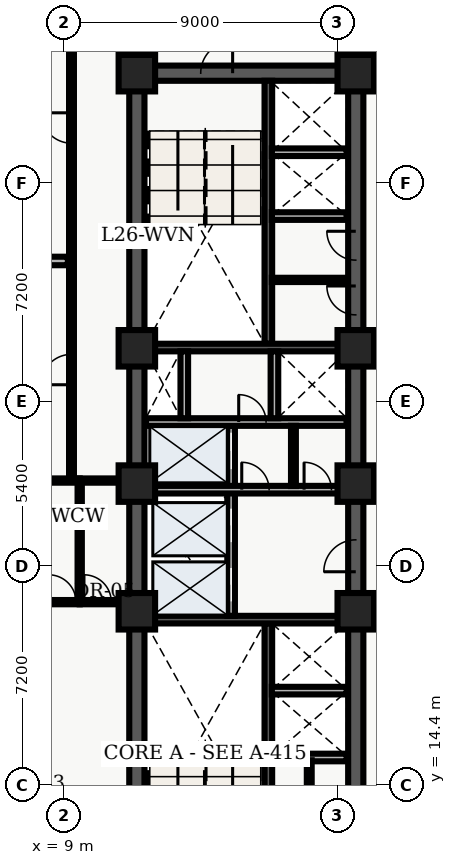
"""IFC4 building model, lengths in metres.
Left out: names, types, materials, properties, quantities, classifications, styles, units other than length and angle.
Written with IfcOpenShell. Run it as: python <this file> out.ifc"""

import sys

from ifc_helpers import new_model, entity, si_unit, converted_unit, direction, frame, origin_with_axes, origin_2d_with_axis, place, context, subcontext, project, spatial, polyline, rectangle, outline, extrude, element, fill, save


model = new_model("IFC4")
c1 = context("Model", 3, precision=1e-05, world=origin_with_axes(), true_north=direction((0.0, 1.0)))
c2 = subcontext(c1, "Body", "Model", "MODEL_VIEW")
j1 = project(units=[si_unit("LENGTHUNIT", "METRE"), converted_unit("PLANEANGLEUNIT", "DEGREE", entity("IfcPlaneAngleMeasure", 0.017), si_unit("PLANEANGLEUNIT", "RADIAN"), dimensions=[0, 0, 0, 0, 0, 0, 0])], contexts=[c1])
p1 = place(None, origin_with_axes())
s1 = spatial("IfcSite", under=j1, at=p1, CompositionType="ELEMENT")
p2 = place(p1, origin_with_axes())
s2 = spatial("IfcBuilding", under=s1, at=p2, CompositionType="ELEMENT")
p3 = place(p2, frame((0.0, 0.0, 108.6), z_axis=(0.0, 0.0, 1.0), x_axis=(1.0, 0.0, 0.0)))
s3 = spatial("IfcBuildingStorey", under=s2, at=p3, CompositionType="ELEMENT", Elevation=108.6)
p4 = place(p3, frame((11.4, 10.8, 0.0), z_axis=(0.0, 0.0, 1.0), x_axis=(0.0, 1.0, 0.0)))
e1 = element("IfcWall", 1, at=p4, inside=s3, PredefinedType="SHEAR", context=c2, shape_type="SweptSolid", body=[
    extrude(outline(polyline([(0.0, -0.25), (27.0, -0.25), (27.0, 0.25), (0.0, 0.25), (0.0, -0.25)])), origin_with_axes(), (0.0, 0.0, 1.0), 3.66),
])
p5 = place(p3, frame((11.4, 37.8, 0.0), z_axis=(0.0, 0.0, 1.0), x_axis=(1.0, 0.0, 0.0)))
e2 = element("IfcWall", 2, at=p5, inside=s3, PredefinedType="SHEAR", context=c2, shape_type="SweptSolid", body=[
    extrude(outline(polyline([(0.0, -0.25), (7.2, -0.25), (7.2, 0.25), (0.0, 0.25), (0.0, -0.25)])), origin_with_axes(), (0.0, 0.0, 1.0), 3.66),
])
p6 = place(p5, frame((2.625, 0.0, 0.0), z_axis=(0.0, 0.0, 1.0), x_axis=(1.0, 0.0, 0.0)))
e3 = element("IfcOpeningElement", 3, at=p6, cuts=e2, PredefinedType="OPENING", context=c2, shape_type="SweptSolid", body=[
    extrude(rectangle(XDim=1.05, YDim=0.52, at=origin_2d_with_axis()), origin_with_axes(), (0.0, 0.0, 1.0), 2.15),
])
p7 = place(p3, frame((18.6, 10.8, 0.0), z_axis=(0.0, 0.0, 1.0), x_axis=(0.0, 1.0, 0.0)))
e4 = element("IfcWall", 4, at=p7, inside=s3, PredefinedType="SHEAR", context=c2, shape_type="SweptSolid", body=[
    extrude(outline(polyline([(0.0, -0.25), (13.5, -0.25), (13.5, 0.25), (0.0, 0.25), (0.0, -0.25)])), origin_with_axes(), (0.0, 0.0, 1.0), 3.66),
])
p8 = place(p7, frame((11.125, 0.0, 0.0), z_axis=(0.0, 0.0, 1.0), x_axis=(1.0, 0.0, 0.0)))
e5 = element("IfcOpeningElement", 5, at=p8, cuts=e4, PredefinedType="OPENING", context=c2, shape_type="SweptSolid", body=[
    extrude(rectangle(XDim=1.05, YDim=0.52, at=origin_2d_with_axis()), origin_with_axes(), (0.0, 0.0, 1.0), 2.15),
])
p9 = place(p7, frame((2.575, 0.0, 0.0), z_axis=(0.0, 0.0, 1.0), x_axis=(1.0, 0.0, 0.0)))
e6 = element("IfcOpeningElement", 6, at=p9, cuts=e4, PredefinedType="OPENING", context=c2, shape_type="SweptSolid", body=[
    extrude(rectangle(XDim=0.95, YDim=0.52, at=origin_2d_with_axis()), origin_with_axes(), (0.0, 0.0, 1.0), 2.15),
])
p10 = place(p3, frame((18.6, 24.3, 0.0), z_axis=(0.0, 0.0, 1.0), x_axis=(0.0, 1.0, 0.0)))
e7 = element("IfcWall", 7, at=p10, inside=s3, PredefinedType="SHEAR", context=c2, shape_type="SweptSolid", body=[
    extrude(outline(polyline([(0.0, -0.25), (13.5, -0.25), (13.5, 0.25), (0.0, 0.25), (0.0, -0.25)])), origin_with_axes(), (0.0, 0.0, 1.0), 3.66),
])
p11 = place(p10, frame((6.025, 0.0, 0.0), z_axis=(0.0, 0.0, 1.0), x_axis=(1.0, 0.0, 0.0)))
e8 = element("IfcOpeningElement", 8, at=p11, cuts=e7, PredefinedType="OPENING", context=c2, shape_type="SweptSolid", body=[
    extrude(rectangle(XDim=0.95, YDim=0.52, at=origin_2d_with_axis()), origin_with_axes(), (0.0, 0.0, 1.0), 2.15),
])
p12 = place(p10, frame((7.825, 0.0, 0.0), z_axis=(0.0, 0.0, 1.0), x_axis=(1.0, 0.0, 0.0)))
e9 = element("IfcOpeningElement", 9, at=p12, cuts=e7, PredefinedType="OPENING", context=c2, shape_type="SweptSolid", body=[
    extrude(rectangle(XDim=0.95, YDim=0.52, at=origin_2d_with_axis()), origin_with_axes(), (0.0, 0.0, 1.0), 2.15),
])
p13 = place(p3, frame((15.725, 11.05, 0.0), z_axis=(0.0, 0.0, 1.0), x_axis=(0.0, 1.0, 0.0)))
e10 = element("IfcWall", 10, at=p13, inside=s3, PredefinedType="SHEAR", context=c2, shape_type="SweptSolid", body=[
    extrude(outline(polyline([(0.0, -0.125), (8.65, -0.125), (8.65, 0.125), (0.0, 0.125), (0.0, -0.125)])), origin_with_axes(), (0.0, 0.0, 1.0), 3.66),
])
p14 = place(p3, frame((11.65, 19.825, 0.0), z_axis=(0.0, 0.0, 1.0), x_axis=(1.0, 0.0, 0.0)))
e11 = element("IfcWall", 11, at=p14, inside=s3, PredefinedType="SHEAR", context=c2, shape_type="SweptSolid", body=[
    extrude(outline(polyline([(0.0, -0.125), (6.7, -0.125), (6.7, 0.125), (0.0, 0.125), (0.0, -0.125)])), origin_with_axes(), (0.0, 0.0, 1.0), 3.66),
])
p15 = place(p3, frame((15.725, 28.9, 0.0), z_axis=(0.0, 0.0, 1.0), x_axis=(0.0, 1.0, 0.0)))
e12 = element("IfcWall", 12, at=p15, inside=s3, PredefinedType="SHEAR", context=c2, shape_type="SweptSolid", body=[
    extrude(outline(polyline([(0.0, -0.125), (8.65, -0.125), (8.65, 0.125), (0.0, 0.125), (0.0, -0.125)])), origin_with_axes(), (0.0, 0.0, 1.0), 3.66),
])
p16 = place(p3, frame((11.65, 28.775, 0.0), z_axis=(0.0, 0.0, 1.0), x_axis=(1.0, 0.0, 0.0)))
e13 = element("IfcWall", 13, at=p16, inside=s3, PredefinedType="SHEAR", context=c2, shape_type="SweptSolid", body=[
    extrude(outline(polyline([(0.0, -0.125), (6.7, -0.125), (6.7, 0.125), (0.0, 0.125), (0.0, -0.125)])), origin_with_axes(), (0.0, 0.0, 1.0), 3.66),
])
p17 = place(p3, frame((14.5, 19.95, 0.0), z_axis=(0.0, 0.0, 1.0), x_axis=(0.0, 1.0, 0.0)))
e14 = element("IfcWall", 14, at=p17, inside=s3, PredefinedType="SOLIDWALL", context=c2, shape_type="SweptSolid", body=[
    extrude(outline(polyline([(0.0, -0.125), (6.25, -0.125), (6.25, 0.125), (0.0, 0.125), (0.0, -0.125)])), origin_with_axes(), (0.0, 0.0, 1.0), 2.7),
])
p18 = place(p17, frame((1.025, 0.0, 0.0), z_axis=(0.0, 0.0, 1.0), x_axis=(1.0, 0.0, 0.0)))
e15 = element("IfcOpeningElement", 15, at=p18, cuts=e14, PredefinedType="OPENING", context=c2, shape_type="SweptSolid", body=[
    extrude(rectangle(XDim=1.1, YDim=0.27, at=origin_2d_with_axis()), origin_with_axes(), (0.0, 0.0, 1.0), 2.15),
])
p19 = place(p17, frame((2.975, 0.0, 0.0), z_axis=(0.0, 0.0, 1.0), x_axis=(1.0, 0.0, 0.0)))
e16 = element("IfcOpeningElement", 16, at=p19, cuts=e14, PredefinedType="OPENING", context=c2, shape_type="SweptSolid", body=[
    extrude(rectangle(XDim=1.1, YDim=0.27, at=origin_2d_with_axis()), origin_with_axes(), (0.0, 0.0, 1.0), 2.15),
])
p20 = place(p17, frame((5.425, 0.0, 0.0), z_axis=(0.0, 0.0, 1.0), x_axis=(1.0, 0.0, 0.0)))
e17 = element("IfcOpeningElement", 17, at=p20, cuts=e14, PredefinedType="OPENING", context=c2, shape_type="SweptSolid", body=[
    extrude(rectangle(XDim=1.2, YDim=0.27, at=origin_2d_with_axis()), origin_with_axes(), (0.0, 0.0, 1.0), 2.15),
])
p21 = place(p3, frame((11.7, 24.1, 0.0), z_axis=(0.0, 0.0, 1.0), x_axis=(1.0, 0.0, 0.0)))
e18 = element("IfcWall", 18, at=p21, inside=s3, PredefinedType="SOLIDWALL", context=c2, shape_type="SweptSolid", body=[
    extrude(outline(polyline([(0.0, -0.125), (6.6, -0.125), (6.6, 0.125), (0.0, 0.125), (0.0, -0.125)])), origin_with_axes(), (0.0, 0.0, 1.0), 2.7),
])
p22 = place(p21, frame((3.6, 0.0, 0.0), z_axis=(0.0, 0.0, 1.0), x_axis=(1.0, 0.0, 0.0)))
e19 = element("IfcOpeningElement", 19, at=p22, cuts=e18, PredefinedType="OPENING", context=c2, shape_type="SweptSolid", body=[
    extrude(rectangle(XDim=0.9, YDim=0.27, at=origin_2d_with_axis()), origin_with_axes(), (0.0, 0.0, 1.0), 2.15),
])
p23 = place(p21, frame((5.65, 0.0, 0.0), z_axis=(0.0, 0.0, 1.0), x_axis=(1.0, 0.0, 0.0)))
e20 = element("IfcOpeningElement", 20, at=p23, cuts=e18, PredefinedType="OPENING", context=c2, shape_type="SweptSolid", body=[
    extrude(rectangle(XDim=0.9, YDim=0.27, at=origin_2d_with_axis()), origin_with_axes(), (0.0, 0.0, 1.0), 2.15),
])
p24 = place(p3, frame((11.7, 26.325, 0.0), z_axis=(0.0, 0.0, 1.0), x_axis=(1.0, 0.0, 0.0)))
e21 = element("IfcWall", 21, at=p24, inside=s3, PredefinedType="SOLIDWALL", context=c2, shape_type="SweptSolid", body=[
    extrude(outline(polyline([(0.0, -0.125), (6.6, -0.125), (6.6, 0.125), (0.0, 0.125), (0.0, -0.125)])), origin_with_axes(), (0.0, 0.0, 1.0), 2.7),
])
p25 = place(p24, frame((3.5, 0.0, 0.0), z_axis=(0.0, 0.0, 1.0), x_axis=(1.0, 0.0, 0.0)))
e22 = element("IfcOpeningElement", 22, at=p25, cuts=e21, PredefinedType="OPENING", context=c2, shape_type="SweptSolid", body=[
    extrude(rectangle(XDim=0.9, YDim=0.27, at=origin_2d_with_axis()), origin_with_axes(), (0.0, 0.0, 1.0), 2.15),
])
for number, where, z_axis, x_axis in (
    (23, (12.96, 26.45, 0.0), (0.0, 0.0, 1.0), (0.0, 1.0, 0.0)),
    (24, (15.925, 26.45, 0.0), (0.0, 0.0, 1.0), (0.0, 1.0, 0.0)),
):
    element("IfcWall", number, at=place(p3, frame(where, z_axis=z_axis, x_axis=x_axis)), inside=s3, PredefinedType="SOLIDWALL", context=c2, shape_type="SweptSolid", body=[
        extrude(outline(polyline([(0.0, -0.125), (2.2, -0.125), (2.2, 0.125), (0.0, 0.125), (0.0, -0.125)])), origin_with_axes(), (0.0, 0.0, 1.0), 2.7),
    ])
for number, where, z_axis, x_axis in (
    (25, (11.4, 20.1, 0.0), (0.0, 0.0, 1.0), (1.0, 0.0, 0.0)),
    (26, (11.4, 24.3, 0.0), (0.0, 0.0, 1.0), (1.0, 0.0, 0.0)),
    (27, (11.4, 28.75, 0.0), (0.0, 0.0, 1.0), (1.0, 0.0, 0.0)),
    (28, (11.4, 37.8, 0.0), (0.0, 0.0, 1.0), (1.0, 0.0, 0.0)),
    (29, (18.6, 20.1, 0.0), (0.0, 0.0, 1.0), (1.0, 0.0, 0.0)),
    (30, (18.6, 24.3, 0.0), (0.0, 0.0, 1.0), (1.0, 0.0, 0.0)),
    (31, (18.6, 28.75, 0.0), (0.0, 0.0, 1.0), (1.0, 0.0, 0.0)),
    (32, (18.6, 37.8, 0.0), (0.0, 0.0, 1.0), (1.0, 0.0, 0.0)),
):
    element("IfcColumn", number, at=place(p3, frame(where, z_axis=z_axis, x_axis=x_axis)), inside=s3, PredefinedType="COLUMN", context=c2, shape_type="SweptSolid", body=[
        extrude(rectangle(XDim=1.2, YDim=1.2, at=origin_2d_with_axis()), origin_with_axes(), (0.0, 0.0, 1.0), 3.9),
    ])
p26 = place(p3, frame((16.55, 24.22, 0.0), z_axis=(0.0, 0.0, 1.0), x_axis=(0.0, 1.0, 0.0)))
e33 = element("IfcWall", 33, at=p26, inside=s3, PredefinedType="PARTITIONING", context=c2, shape_type="SweptSolid", body=[
    extrude(outline(polyline([(0.0, -0.08), (1.98, -0.08), (1.98, 0.08), (0.0, 0.08), (0.0, -0.08)])), origin_with_axes(), (0.0, 0.0, 1.0), 2.7),
])
for number, where, z_axis, x_axis in (
    (34, (15.84, 15.29, 0.0), (0.0, 0.0, 1.0), (1.0, 0.0, 0.0)),
    (35, (15.84, 17.49, 0.0), (0.0, 0.0, 1.0), (1.0, 0.0, 0.0)),
):
    element("IfcWall", number, at=place(p3, frame(where, z_axis=z_axis, x_axis=x_axis)), inside=s3, PredefinedType="SOLIDWALL", context=c2, shape_type="SweptSolid", body=[
        extrude(outline(polyline([(0.0, -0.125), (2.46, -0.125), (2.46, 0.125), (0.0, 0.125), (0.0, -0.125)])), origin_with_axes(), (0.0, 0.0, 1.0), 2.7),
    ])
p27 = place(p3, frame((17.07, 11.1, 0.0), z_axis=(0.0, 0.0, 1.0), x_axis=(0.0, 1.0, 0.0)))
e36 = element("IfcWall", 36, at=p27, inside=s3, PredefinedType="PARTITIONING", context=c2, shape_type="SweptSolid", body=[
    extrude(outline(polyline([(0.0, -0.08), (4.1, -0.08), (4.1, 0.08), (0.0, 0.08), (0.0, -0.08)])), origin_with_axes(), (0.0, 0.0, 1.0), 2.7),
])
p28 = place(p27, frame((2.05, 0.0, 0.0), z_axis=(0.0, 0.0, 1.0), x_axis=(1.0, 0.0, 0.0)))
e37 = element("IfcOpeningElement", 37, at=p28, cuts=e36, PredefinedType="OPENING", context=c2, shape_type="SweptSolid", body=[
    extrude(rectangle(XDim=0.9, YDim=0.18, at=origin_2d_with_axis()), origin_with_axes(), (0.0, 0.0, 1.0), 2.15),
])
for number, where, z_axis, x_axis in (
    (38, (15.84, 33.1, 0.0), (0.0, 0.0, 1.0), (1.0, 0.0, 0.0)),
    (39, (15.84, 35.2, 0.0), (0.0, 0.0, 1.0), (1.0, 0.0, 0.0)),
):
    element("IfcWall", number, at=place(p3, frame(where, z_axis=z_axis, x_axis=x_axis)), inside=s3, PredefinedType="SOLIDWALL", context=c2, shape_type="SweptSolid", body=[
        extrude(outline(polyline([(0.0, -0.125), (2.46, -0.125), (2.46, 0.125), (0.0, 0.125), (0.0, -0.125)])), origin_with_axes(), (0.0, 0.0, 1.0), 2.7),
    ])
p29 = place(p3, frame((15.84, 31.0, 0.0), z_axis=(0.0, 0.0, 1.0), x_axis=(1.0, 0.0, 0.0)))
e40 = element("IfcWall", 40, at=p29, inside=s3, PredefinedType="PARTITIONING", context=c2, shape_type="SweptSolid", body=[
    extrude(outline(polyline([(0.0, -0.07), (2.46, -0.07), (2.46, 0.07), (0.0, 0.07), (0.0, -0.07)])), origin_with_axes(), (0.0, 0.0, 1.0), 2.7),
])
p30 = place(p3, frame((9.52, 20.4, 0.0), z_axis=(0.0, 0.0, 1.0), x_axis=(0.0, 1.0, 0.0)))
e41 = element("IfcWall", 41, at=p30, inside=s3, PredefinedType="PARTITIONING", context=c2, shape_type="SweptSolid", body=[
    extrude(outline(polyline([(0.0, -0.07), (4.0, -0.07), (4.0, 0.07), (0.0, 0.07), (0.0, -0.07)])), origin_with_axes(), (0.0, 0.0, 1.0), 2.7),
])
p31 = place(p3, frame((9.52, 20.4, 0.0), z_axis=(0.0, 0.0, 1.0), x_axis=(1.0, 0.0, 0.0)))
e42 = element("IfcWall", 42, at=p31, inside=s3, PredefinedType="PARTITIONING", context=c2, shape_type="SweptSolid", body=[
    extrude(outline(polyline([(0.0, -0.07), (1.58, -0.07), (1.58, 0.07), (0.0, 0.07), (0.0, -0.07)])), origin_with_axes(), (0.0, 0.0, 1.0), 2.7),
])
p32 = place(p31, frame((0.59, 0.0, 0.0), z_axis=(0.0, 0.0, 1.0), x_axis=(1.0, 0.0, 0.0)))
e43 = element("IfcOpeningElement", 43, at=p32, cuts=e42, PredefinedType="OPENING", context=c2, shape_type="SweptSolid", body=[
    extrude(rectangle(XDim=0.9, YDim=0.16, at=origin_2d_with_axis()), origin_with_axes(), (0.0, 0.0, 1.0), 2.15),
])
p33 = place(p3, frame((9.52, 24.4, 0.0), z_axis=(0.0, 0.0, 1.0), x_axis=(1.0, 0.0, 0.0)))
e44 = element("IfcWall", 44, at=p33, inside=s3, PredefinedType="PARTITIONING", context=c2, shape_type="SweptSolid", body=[
    extrude(outline(polyline([(0.0, -0.07), (1.58, -0.07), (1.58, 0.07), (0.0, 0.07), (0.0, -0.07)])), origin_with_axes(), (0.0, 0.0, 1.0), 2.7),
])
p34 = place(p3, frame((9.25, 24.4, 0.0), z_axis=(0.0, 0.0, 1.0), x_axis=(0.0, 1.0, 0.0)))
e45 = element("IfcWall", 45, at=p34, inside=s3, PredefinedType="PARTITIONING", context=c2, shape_type="SweptSolid", body=[
    extrude(outline(polyline([(0.0, -0.08), (16.1, -0.08), (16.1, 0.08), (0.0, 0.08), (0.0, -0.08)])), origin_with_axes(), (0.0, 0.0, 1.0), 2.7),
])
p35 = place(p34, frame((3.651, 0.0, 0.0), z_axis=(0.0, 0.0, 1.0), x_axis=(1.0, 0.0, 0.0)))
e46 = element("IfcOpeningElement", 46, at=p35, cuts=e45, PredefinedType="OPENING", context=c2, shape_type="SweptSolid", body=[
    extrude(rectangle(XDim=1.0, YDim=0.18, at=origin_2d_with_axis()), origin_with_axes(), (0.0, 0.0, 1.0), 2.15),
])
p36 = place(p34, frame((11.597, 0.0, 0.0), z_axis=(0.0, 0.0, 1.0), x_axis=(1.0, 0.0, 0.0)))
e47 = element("IfcOpeningElement", 47, at=p36, cuts=e45, PredefinedType="OPENING", context=c2, shape_type="SweptSolid", body=[
    extrude(rectangle(XDim=1.0, YDim=0.18, at=origin_2d_with_axis()), origin_with_axes(), (0.0, 0.0, 1.0), 2.15),
])
p37 = place(p3, frame((0.36, 20.4, 0.0), z_axis=(0.0, 0.0, 1.0), x_axis=(1.0, 0.0, 0.0)))
e48 = element("IfcWall", 48, at=p37, inside=s3, PredefinedType="PARTITIONING", context=c2, shape_type="SweptSolid", body=[
    extrude(outline(polyline([(0.0, -0.07), (9.16, -0.07), (9.16, 0.07), (0.0, 0.07), (0.0, -0.07)])), origin_with_axes(), (0.0, 0.0, 1.0), 2.7),
])
p38 = place(p37, frame((8.59, 0.0, 0.0), z_axis=(0.0, 0.0, 1.0), x_axis=(1.0, 0.0, 0.0)))
e49 = element("IfcOpeningElement", 49, at=p38, cuts=e48, PredefinedType="OPENING", context=c2, shape_type="SweptSolid", body=[
    extrude(rectangle(XDim=0.9, YDim=0.16, at=origin_2d_with_axis()), origin_with_axes(), (0.0, 0.0, 1.0), 2.15),
])
p39 = place(p3, frame((0.36, 24.4, 0.0), z_axis=(0.0, 0.0, 1.0), x_axis=(1.0, 0.0, 0.0)))
e50 = element("IfcWall", 50, at=p39, inside=s3, PredefinedType="PARTITIONING", context=c2, shape_type="SweptSolid", body=[
    extrude(outline(polyline([(0.0, -0.07), (9.16, -0.07), (9.16, 0.07), (0.0, 0.07), (0.0, -0.07)])), origin_with_axes(), (0.0, 0.0, 1.0), 2.7),
])
p40 = place(p3, frame((0.375, 31.623, 0.0), z_axis=(0.0, 0.0, 1.0), x_axis=(1.0, 0.0, 0.0)))
e51 = element("IfcWall", 51, at=p40, inside=s3, PredefinedType="PARTITIONING", context=c2, shape_type="SweptSolid", body=[
    extrude(outline(polyline([(0.0, -0.14), (8.755, -0.14), (8.755, 0.14), (0.0, 0.14), (0.0, -0.14)])), origin_with_axes(), (0.0, 0.0, 1.0), 2.7),
])
p41 = place(p17, frame((1.025, 0.0, 0.0), z_axis=(0.0, 0.0, 1.0), x_axis=(1.0, 0.0, 0.0)))
e52 = element("IfcDoor", 52, at=p41, inside=s3, OperationType="SLIDING_TO_LEFT", PredefinedType="DOOR", context=c2, shape_type="SweptSolid", body=[
    extrude(rectangle(XDim=1.1, YDim=0.09, at=origin_2d_with_axis()), origin_with_axes(), (0.0, 0.0, 1.0), 2.15),
])
fill(e15, e52)
p42 = place(p17, frame((2.975, 0.0, 0.0), z_axis=(0.0, 0.0, 1.0), x_axis=(1.0, 0.0, 0.0)))
e53 = element("IfcDoor", 53, at=p42, inside=s3, OperationType="SLIDING_TO_RIGHT", PredefinedType="DOOR", context=c2, shape_type="SweptSolid", body=[
    extrude(rectangle(XDim=1.1, YDim=0.09, at=origin_2d_with_axis()), origin_with_axes(), (0.0, 0.0, 1.0), 2.15),
])
fill(e16, e53)
p43 = place(p17, frame((5.425, 0.0, 0.0), z_axis=(0.0, 0.0, 1.0), x_axis=(1.0, 0.0, 0.0)))
e54 = element("IfcDoor", 54, at=p43, inside=s3, OperationType="DOUBLE_DOOR_SLIDING", PredefinedType="DOOR", context=c2, shape_type="SweptSolid", body=[
    extrude(rectangle(XDim=1.2, YDim=0.09, at=origin_2d_with_axis()), origin_with_axes(), (0.0, 0.0, 1.0), 2.15),
])
fill(e17, e54)
p44 = place(p5, frame((2.625, 0.0, 0.0), z_axis=(0.0, 0.0, 1.0), x_axis=(1.0, 0.0, 0.0)))
e55 = element("IfcDoor", 55, at=p44, inside=s3, OperationType="SINGLE_SWING_RIGHT", PredefinedType="DOOR", context=c2, shape_type="SweptSolid", body=[
    extrude(rectangle(XDim=1.05, YDim=0.09, at=origin_2d_with_axis()), origin_with_axes(), (0.0, 0.0, 1.0), 2.15),
])
fill(e3, e55)
p45 = place(p7, frame((11.125, 0.0, 0.0), z_axis=(0.0, 0.0, 1.0), x_axis=(1.0, 0.0, 0.0)))
e56 = element("IfcDoor", 56, at=p45, inside=s3, OperationType="SINGLE_SWING_LEFT", PredefinedType="DOOR", context=c2, shape_type="SweptSolid", body=[
    extrude(rectangle(XDim=1.05, YDim=0.09, at=origin_2d_with_axis()), origin_with_axes(), (0.0, 0.0, 1.0), 2.15),
])
fill(e5, e56)
p46 = place(p21, frame((3.6, 0.0, 0.0), z_axis=(0.0, 0.0, 1.0), x_axis=(1.0, 0.0, 0.0)))
e57 = element("IfcDoor", 57, at=p46, inside=s3, OperationType="SINGLE_SWING_LEFT", PredefinedType="DOOR", context=c2, shape_type="SweptSolid", body=[
    extrude(rectangle(XDim=0.9, YDim=0.09, at=origin_2d_with_axis()), origin_with_axes(), (0.0, 0.0, 1.0), 2.15),
])
fill(e19, e57)
p47 = place(p21, frame((5.65, 0.0, 0.0), z_axis=(0.0, 0.0, 1.0), x_axis=(1.0, 0.0, 0.0)))
e58 = element("IfcDoor", 58, at=p47, inside=s3, OperationType="SINGLE_SWING_LEFT", PredefinedType="DOOR", context=c2, shape_type="SweptSolid", body=[
    extrude(rectangle(XDim=0.9, YDim=0.09, at=origin_2d_with_axis()), origin_with_axes(), (0.0, 0.0, 1.0), 2.15),
])
fill(e20, e58)
p48 = place(p24, frame((3.5, 0.0, 0.0), z_axis=(0.0, 0.0, 1.0), x_axis=(1.0, 0.0, 0.0)))
e59 = element("IfcDoor", 59, at=p48, inside=s3, OperationType="SINGLE_SWING_LEFT", PredefinedType="DOOR", context=c2, shape_type="SweptSolid", body=[
    extrude(rectangle(XDim=0.9, YDim=0.09, at=origin_2d_with_axis()), origin_with_axes(), (0.0, 0.0, 1.0), 2.15),
])
fill(e22, e59)
p49 = place(p10, frame((6.025, 0.0, 0.0), z_axis=(0.0, 0.0, 1.0), x_axis=(1.0, 0.0, 0.0)))
e60 = element("IfcDoor", 60, at=p49, inside=s3, OperationType="SINGLE_SWING_RIGHT", PredefinedType="DOOR", context=c2, shape_type="SweptSolid", body=[
    extrude(rectangle(XDim=0.95, YDim=0.09, at=origin_2d_with_axis()), origin_with_axes(), (0.0, 0.0, 1.0), 2.15),
])
fill(e8, e60)
p50 = place(p10, frame((7.825, 0.0, 0.0), z_axis=(0.0, 0.0, 1.0), x_axis=(1.0, 0.0, 0.0)))
e61 = element("IfcDoor", 61, at=p50, inside=s3, OperationType="SINGLE_SWING_RIGHT", PredefinedType="DOOR", context=c2, shape_type="SweptSolid", body=[
    extrude(rectangle(XDim=0.95, YDim=0.09, at=origin_2d_with_axis()), origin_with_axes(), (0.0, 0.0, 1.0), 2.15),
])
fill(e9, e61)
p51 = place(p31, frame((0.59, 0.0, 0.0), z_axis=(0.0, 0.0, 1.0), x_axis=(1.0, 0.0, 0.0)))
e62 = element("IfcDoor", 62, at=p51, inside=s3, OperationType="SINGLE_SWING_LEFT", PredefinedType="DOOR", context=c2, shape_type="SweptSolid", body=[
    extrude(rectangle(XDim=0.9, YDim=0.084, at=origin_2d_with_axis()), origin_with_axes(), (0.0, 0.0, 1.0), 2.15),
])
fill(e43, e62)
p52 = place(p37, frame((8.59, 0.0, 0.0), z_axis=(0.0, 0.0, 1.0), x_axis=(1.0, 0.0, 0.0)))
e63 = element("IfcDoor", 63, at=p52, inside=s3, OperationType="SINGLE_SWING_LEFT", PredefinedType="DOOR", context=c2, shape_type="SweptSolid", body=[
    extrude(rectangle(XDim=0.9, YDim=0.084, at=origin_2d_with_axis()), origin_with_axes(), (0.0, 0.0, 1.0), 2.15),
])
fill(e49, e63)
p53 = place(p34, frame((3.651, 0.0, 0.0), z_axis=(0.0, 0.0, 1.0), x_axis=(1.0, 0.0, 0.0)))
e64 = element("IfcDoor", 64, at=p53, inside=s3, OperationType="SINGLE_SWING_LEFT", PredefinedType="DOOR", context=c2, shape_type="SweptSolid", body=[
    extrude(rectangle(XDim=1.0, YDim=0.09, at=origin_2d_with_axis()), origin_with_axes(), (0.0, 0.0, 1.0), 2.15),
])
fill(e46, e64)
p54 = place(p34, frame((11.597, 0.0, 0.0), z_axis=(0.0, 0.0, 1.0), x_axis=(1.0, 0.0, 0.0)))
e65 = element("IfcDoor", 65, at=p54, inside=s3, OperationType="SINGLE_SWING_RIGHT", PredefinedType="DOOR", context=c2, shape_type="SweptSolid", body=[
    extrude(rectangle(XDim=1.0, YDim=0.09, at=origin_2d_with_axis()), origin_with_axes(), (0.0, 0.0, 1.0), 2.15),
])
fill(e47, e65)
save(model, sys.argv[1])
